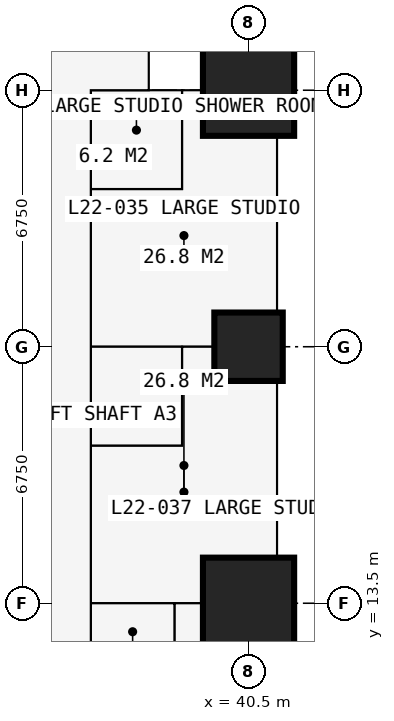
"""IFC4 building model, lengths in metres.
Left out: names, types, materials, properties, quantities, classifications, styles, units other than length and angle.
Written with IfcOpenShell. Run it as: python <this file> out.ifc"""

import sys

from ifc_helpers import new_model, si_unit, direction, frame, frame_2d, origin, origin_2d, place, context, subcontext, project, spatial, rectangle, extrude, element, fill, save


model = new_model("IFC4")
c1 = context("Model", 3, precision=1e-05, world=origin(), true_north=direction((0.0, 1.0)))
c2 = subcontext(c1, "Body", "Model", "MODEL_VIEW")
j1 = project(units=[si_unit("LENGTHUNIT", "METRE"), si_unit("PLANEANGLEUNIT", "RADIAN")], contexts=[c1])
p1 = place(None, origin())
s1 = spatial("IfcSite", under=j1, at=p1, CompositionType="ELEMENT")
p2 = place(p1, origin())
s2 = spatial("IfcBuilding", under=s1, at=p2, CompositionType="ELEMENT")
p3 = place(p2, frame((0.0, 0.0, 83.7)))
s3 = spatial("IfcBuildingStorey", under=s2, at=p3, CompositionType="ELEMENT", Elevation=83.7)
p4 = place(p3, frame((40.5, 13.5, 0.0), z_axis=(0.0, 0.0, 1.0), x_axis=(1.0, 0.0, 0.0)))
e1 = element("IfcColumn", 1, at=p4, inside=s3, PredefinedType="COLUMN", context=c2, shape_type="SweptSolid", body=[
    extrude(rectangle(XDim=2.4, YDim=2.4, at=origin_2d()), origin(), (0.0, 0.0, 1.0), 3.6),
])
p5 = place(p3, frame((40.5, 20.25, 0.0), z_axis=(0.0, 0.0, 1.0), x_axis=(1.0, 0.0, 0.0)))
e2 = element("IfcColumn", 2, at=p5, inside=s3, PredefinedType="COLUMN", context=c2, shape_type="SweptSolid", body=[
    extrude(rectangle(XDim=1.8, YDim=1.8, at=origin_2d()), origin(), (0.0, 0.0, 1.0), 3.6),
])
p6 = place(p3, frame((40.5, 27.0, 0.0), z_axis=(0.0, 0.0, 1.0), x_axis=(1.0, 0.0, 0.0)))
e3 = element("IfcColumn", 3, at=p6, inside=s3, PredefinedType="COLUMN", context=c2, shape_type="SweptSolid", body=[
    extrude(rectangle(XDim=2.4, YDim=2.4, at=origin_2d()), origin(), (0.0, 0.0, 1.0), 3.6),
])
p7 = place(p3, frame((41.25, 27.75, 0.0), z_axis=(0.0, 0.0, 1.0), x_axis=(-1.0, 0.0, 0.0)))
e4 = element("IfcWall", 4, at=p7, inside=s3, PredefinedType="SOLIDWALL", context=c2, shape_type="SweptSolid", body=[
    extrude(rectangle(XDim=3.375, YDim=0.3, at=frame_2d((1.688, 0.0))), origin(), (0.0, 0.0, 1.0), 3.375),
])
p8 = place(p7, frame((1.982, 0.0, 0.9)))
e5 = element("IfcOpeningElement", 5, at=p8, cuts=e4, PredefinedType="OPENING", context=c2, shape_type="SweptSolid", body=[
    extrude(rectangle(XDim=1.2, YDim=1.8, at=frame_2d((0.6, 0.9))), frame((0.0, 0.16, 0.0), z_axis=(0.0, -1.0, 0.0), x_axis=(1.0, 0.0, 0.0)), (0.0, 0.0, 1.0), 0.32),
])
p9 = place(p3, frame((37.875, 27.75, 0.0), z_axis=(0.0, 0.0, 1.0), x_axis=(0.0, 1.0, 0.0)))
e6 = element("IfcWall", 6, at=p9, inside=s3, PredefinedType="SOLIDWALL", context=c2, shape_type="SweptSolid", body=[
    extrude(rectangle(XDim=3.375, YDim=0.3, at=frame_2d((1.688, 0.0))), origin(), (0.0, 0.0, 1.0), 3.375),
])
p10 = place(p9, frame((0.788, 0.0, 0.6)))
e7 = element("IfcOpeningElement", 7, at=p10, cuts=e6, PredefinedType="OPENING", context=c2, shape_type="SweptSolid", body=[
    extrude(rectangle(XDim=1.8, YDim=2.1, at=frame_2d((0.9, 1.05))), frame((0.0, 0.16, 0.0), z_axis=(0.0, -1.0, 0.0), x_axis=(1.0, 0.0, 0.0)), (0.0, 0.0, 1.0), 0.32),
])
p11 = place(p3, frame((36.35, 6.75, 0.0), z_axis=(0.0, 0.0, 1.0), x_axis=(0.0, 1.0, 0.0)))
e8 = element("IfcWall", 8, at=p11, inside=s3, PredefinedType="PARTITIONING", context=c2, shape_type="SweptSolid", body=[
    extrude(rectangle(XDim=20.25, YDim=0.15, at=frame_2d((10.125, 0.0))), origin(), (0.0, 0.0, 1.0), 3.375),
])
p12 = place(p11, frame((15.1, 0.0, 0.0)))
e9 = element("IfcOpeningElement", 9, at=p12, cuts=e8, PredefinedType="OPENING", context=c2, shape_type="SweptSolid", body=[
    extrude(rectangle(XDim=0.95, YDim=2.2, at=frame_2d((0.475, 1.1))), frame((0.0, 0.085, 0.0), z_axis=(0.0, -1.0, 0.0), x_axis=(1.0, 0.0, 0.0)), (0.0, 0.0, 1.0), 0.17),
])
p13 = place(p11, frame((8.35, 0.0, 0.0)))
e10 = element("IfcOpeningElement", 10, at=p13, cuts=e8, PredefinedType="OPENING", context=c2, shape_type="SweptSolid", body=[
    extrude(rectangle(XDim=0.95, YDim=2.2, at=frame_2d((0.475, 1.1))), frame((0.0, 0.085, 0.0), z_axis=(0.0, -1.0, 0.0), x_axis=(1.0, 0.0, 0.0)), (0.0, 0.0, 1.0), 0.17),
])
p14 = place(p11, frame((3.575, 0.0, 0.0)))
e11 = element("IfcOpeningElement", 11, at=p14, cuts=e8, PredefinedType="OPENING", context=c2, shape_type="SweptSolid", body=[
    extrude(rectangle(XDim=0.95, YDim=2.2, at=frame_2d((0.475, 1.1))), frame((0.0, 0.085, 0.0), z_axis=(0.0, -1.0, 0.0), x_axis=(1.0, 0.0, 0.0)), (0.0, 0.0, 1.0), 0.17),
])
p15 = place(p3, frame((36.35, 13.5, 0.0), z_axis=(0.0, 0.0, 1.0), x_axis=(1.0, 0.0, 0.0)))
e12 = element("IfcWall", 12, at=p15, inside=s3, PredefinedType="PARTITIONING", context=c2, shape_type="SweptSolid", body=[
    extrude(rectangle(XDim=4.884, YDim=0.175, at=frame_2d((2.442, 0.0))), origin(), (0.0, 0.0, 1.0), 2.61),
])
p16 = place(p15, frame((0.65, 0.0, 0.0)))
e13 = element("IfcOpeningElement", 13, at=p16, cuts=e12, PredefinedType="OPENING", context=c2, shape_type="SweptSolid", body=[
    extrude(rectangle(XDim=0.9, YDim=2.2, at=frame_2d((0.45, 1.1))), frame((0.0, 0.097, 0.0), z_axis=(0.0, -1.0, 0.0), x_axis=(1.0, 0.0, 0.0)), (0.0, 0.0, 1.0), 0.195),
])
p17 = place(p3, frame((36.35, 17.65, 0.0), z_axis=(0.0, 0.0, 1.0), x_axis=(1.0, 0.0, 0.0)))
e14 = element("IfcWall", 14, at=p17, inside=s3, PredefinedType="PARTITIONING", context=c2, shape_type="SweptSolid", body=[
    extrude(rectangle(XDim=2.4, YDim=0.1, at=frame_2d((1.2, 0.0))), origin(), (0.0, 0.0, 1.0), 3.375),
])
p18 = place(p3, frame((36.35, 20.25, 0.0), z_axis=(0.0, 0.0, 1.0), x_axis=(1.0, 0.0, 0.0)))
e15 = element("IfcWall", 15, at=p18, inside=s3, PredefinedType="PARTITIONING", context=c2, shape_type="SweptSolid", body=[
    extrude(rectangle(XDim=4.884, YDim=0.175, at=frame_2d((2.442, 0.0))), origin(), (0.0, 0.0, 1.0), 2.61),
])
p19 = place(p18, frame((0.75, 0.0, 0.0)))
e16 = element("IfcOpeningElement", 16, at=p19, cuts=e15, PredefinedType="OPENING", context=c2, shape_type="SweptSolid", body=[
    extrude(rectangle(XDim=0.9, YDim=2.2, at=frame_2d((0.45, 1.1))), frame((0.0, 0.097, 0.0), z_axis=(0.0, -1.0, 0.0), x_axis=(1.0, 0.0, 0.0)), (0.0, 0.0, 1.0), 0.195),
])
p20 = place(p3, frame((36.35, 24.4, 0.0), z_axis=(0.0, 0.0, 1.0), x_axis=(1.0, 0.0, 0.0)))
e17 = element("IfcWall", 17, at=p20, inside=s3, PredefinedType="PARTITIONING", context=c2, shape_type="SweptSolid", body=[
    extrude(rectangle(XDim=2.4, YDim=0.1, at=frame_2d((1.2, 0.0))), origin(), (0.0, 0.0, 1.0), 3.375),
])
p21 = place(p3, frame((36.35, 27.0, 0.0), z_axis=(0.0, 0.0, 1.0), x_axis=(1.0, 0.0, 0.0)))
e18 = element("IfcWall", 18, at=p21, inside=s3, PredefinedType="PARTITIONING", context=c2, shape_type="SweptSolid", body=[
    extrude(rectangle(XDim=4.884, YDim=0.175, at=frame_2d((2.442, 0.0))), origin(), (0.0, 0.0, 1.0), 2.877),
])
p22 = place(p3, frame((37.875, 27.0, 0.0), z_axis=(0.0, 0.0, 1.0), x_axis=(0.0, 1.0, 0.0)))
e19 = element("IfcWall", 19, at=p22, inside=s3, PredefinedType="PARTITIONING", context=c2, shape_type="SweptSolid", body=[
    extrude(rectangle(XDim=0.734, YDim=0.15, at=frame_2d((0.367, 0.0))), origin(), (0.0, 0.0, 1.0), 3.375),
])
p23 = place(p3, frame((38.55, 11.5, 0.0), z_axis=(0.0, 0.0, 1.0), x_axis=(0.0, 1.0, 0.0)))
e20 = element("IfcWall", 20, at=p23, inside=s3, PredefinedType="PARTITIONING", context=c2, shape_type="SweptSolid", body=[
    extrude(rectangle(XDim=2.0, YDim=0.1, at=frame_2d((1.0, 0.0))), origin(), (0.0, 0.0, 1.0), 3.375),
])
p24 = place(p3, frame((38.75, 17.65, 0.0), z_axis=(0.0, 0.0, 1.0), x_axis=(0.0, 1.0, 0.0)))
e21 = element("IfcWall", 21, at=p24, inside=s3, PredefinedType="PARTITIONING", context=c2, shape_type="SweptSolid", body=[
    extrude(rectangle(XDim=2.6, YDim=0.1, at=frame_2d((1.3, 0.0))), origin(), (0.0, 0.0, 1.0), 3.375),
])
p25 = place(p3, frame((38.75, 24.4, 0.0), z_axis=(0.0, 0.0, 1.0), x_axis=(0.0, 1.0, 0.0)))
e22 = element("IfcWall", 22, at=p25, inside=s3, PredefinedType="PARTITIONING", context=c2, shape_type="SweptSolid", body=[
    extrude(rectangle(XDim=2.6, YDim=0.1, at=frame_2d((1.3, 0.0))), origin(), (0.0, 0.0, 1.0), 3.375),
])
p26 = place(p25, frame((0.5, 0.0, 0.0)))
e23 = element("IfcOpeningElement", 23, at=p26, cuts=e22, PredefinedType="OPENING", context=c2, shape_type="SweptSolid", body=[
    extrude(rectangle(XDim=0.9, YDim=2.2, at=frame_2d((0.45, 1.1))), frame((0.0, 0.06, 0.0), z_axis=(0.0, -1.0, 0.0), x_axis=(1.0, 0.0, 0.0)), (0.0, 0.0, 1.0), 0.12),
])
p27 = place(p8, origin())
e24 = element("IfcWindow", 24, at=p27, inside=s3, PartitioningType="SINGLE_PANEL", PredefinedType="WINDOW", context=c2, shape_type="SweptSolid", body=[
    extrude(rectangle(XDim=1.2, YDim=1.8, at=frame_2d((0.6, 0.9))), frame((0.0, 0.03, 0.0), z_axis=(0.0, -1.0, 0.0), x_axis=(1.0, 0.0, 0.0)), (0.0, 0.0, 1.0), 0.06),
])
fill(e5, e24)
p28 = place(p12, origin())
e25 = element("IfcDoor", 25, at=p28, inside=s3, OperationType="SINGLE_SWING_LEFT", PredefinedType="DOOR", context=c2, shape_type="SweptSolid", body=[
    extrude(rectangle(XDim=0.95, YDim=2.2, at=frame_2d((0.475, 1.1))), frame((0.0, 0.025, 0.0), z_axis=(0.0, -1.0, 0.0), x_axis=(1.0, 0.0, 0.0)), (0.0, 0.0, 1.0), 0.05),
])
fill(e9, e25)
p29 = place(p26, origin())
e26 = element("IfcDoor", 26, at=p29, inside=s3, OperationType="SINGLE_SWING_RIGHT", PredefinedType="DOOR", context=c2, shape_type="SweptSolid", body=[
    extrude(rectangle(XDim=0.9, YDim=2.2, at=frame_2d((0.45, 1.1))), frame((0.0, 0.025, 0.0), z_axis=(0.0, -1.0, 0.0), x_axis=(1.0, 0.0, 0.0)), (0.0, 0.0, 1.0), 0.05),
])
fill(e23, e26)
p30 = place(p13, origin())
e27 = element("IfcDoor", 27, at=p30, inside=s3, OperationType="SINGLE_SWING_LEFT", PredefinedType="DOOR", context=c2, shape_type="SweptSolid", body=[
    extrude(rectangle(XDim=0.95, YDim=2.2, at=frame_2d((0.475, 1.1))), frame((0.0, 0.025, 0.0), z_axis=(0.0, -1.0, 0.0), x_axis=(1.0, 0.0, 0.0)), (0.0, 0.0, 1.0), 0.05),
])
fill(e10, e27)
p31 = place(p19, origin())
e28 = element("IfcDoor", 28, at=p31, inside=s3, OperationType="SINGLE_SWING_RIGHT", PredefinedType="DOOR", context=c2, shape_type="SweptSolid", body=[
    extrude(rectangle(XDim=0.9, YDim=2.2, at=frame_2d((0.45, 1.1))), frame((0.0, 0.025, 0.0), z_axis=(0.0, -1.0, 0.0), x_axis=(1.0, 0.0, 0.0)), (0.0, 0.0, 1.0), 0.05),
])
fill(e16, e28)
p32 = place(p16, origin())
e29 = element("IfcDoor", 29, at=p32, inside=s3, OperationType="SINGLE_SWING_RIGHT", PredefinedType="DOOR", context=c2, shape_type="SweptSolid", body=[
    extrude(rectangle(XDim=0.9, YDim=2.2, at=frame_2d((0.45, 1.1))), frame((0.0, 0.025, 0.0), z_axis=(0.0, -1.0, 0.0), x_axis=(1.0, 0.0, 0.0)), (0.0, 0.0, 1.0), 0.05),
])
fill(e13, e29)
save(model, sys.argv[1])
